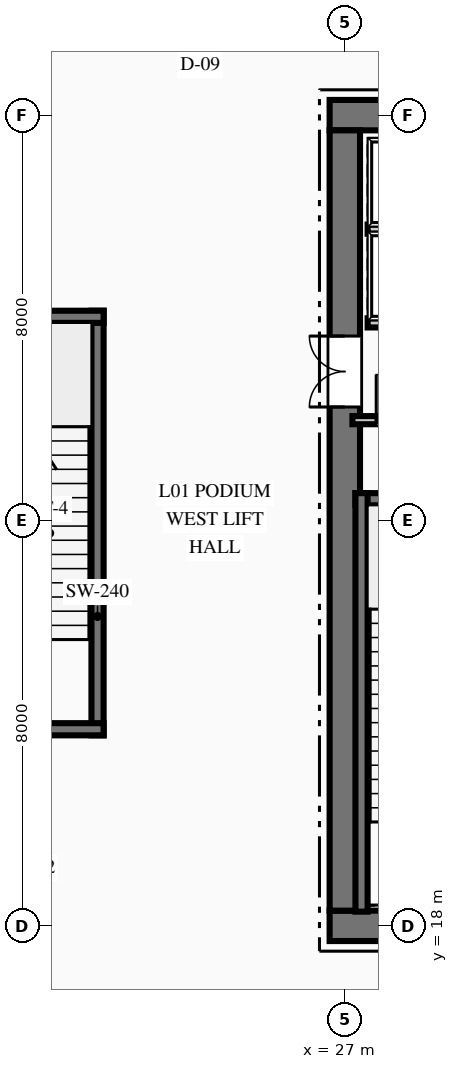
"""IFC4 building model, lengths in metres.
Left out: names, types, materials, properties, quantities, classifications, styles, units other than length and angle.
Written with IfcOpenShell. Run it as: python <this file> out.ifc"""

import sys

from ifc_helpers import new_model, si_unit, direction, frame, frame_2d, origin, place, context, subcontext, project, spatial, rectangle, extrude, element, fill, save


model = new_model("IFC4")
c1 = context("Model", 3, precision=1e-05, world=origin(), true_north=direction((0.0, 1.0)))
c2 = subcontext(c1, "Body", "Model", "MODEL_VIEW")
j1 = project(units=[si_unit("LENGTHUNIT", "METRE"), si_unit("PLANEANGLEUNIT", "RADIAN")], contexts=[c1])
p1 = place(None, origin())
s1 = spatial("IfcSite", under=j1, at=p1, CompositionType="ELEMENT")
p2 = place(p1, origin())
s2 = spatial("IfcBuilding", under=s1, at=p2, CompositionType="ELEMENT")
p3 = place(p2, frame((0.0, 0.0, 6.0)))
s3 = spatial("IfcBuildingStorey", under=s2, at=p3, CompositionType="ELEMENT", Elevation=6.0)
p4 = place(p3, frame((26.7, 18.0, 0.0), z_axis=(0.0, 0.0, 1.0), x_axis=(1.0, 0.0, 0.0)))
e1 = element("IfcWall", 1, at=p4, inside=s3, PredefinedType="SHEAR", context=c2, shape_type="SweptSolid", body=[
    extrude(rectangle(XDim=18.6, YDim=0.6, at=frame_2d((9.3, 0.0))), origin(), (0.0, 0.0, 1.0), 5.4),
])
p5 = place(p4, frame((7.4, 0.0, 0.0)))
e2 = element("IfcOpeningElement", 2, at=p5, cuts=e1, PredefinedType="OPENING", context=c2, shape_type="SweptSolid", body=[
    extrude(rectangle(XDim=1.1, YDim=2.15, at=frame_2d((0.55, 1.075))), frame((0.0, 0.31, 0.0), z_axis=(0.0, -1.0, 0.0), x_axis=(1.0, 0.0, 0.0)), (0.0, 0.0, 1.0), 0.62),
])
p6 = place(p4, frame((10.1, 0.0, 0.0)))
e3 = element("IfcOpeningElement", 3, at=p6, cuts=e1, PredefinedType="OPENING", context=c2, shape_type="SweptSolid", body=[
    extrude(rectangle(XDim=1.1, YDim=2.15, at=frame_2d((0.55, 1.075))), frame((0.0, 0.31, 0.0), z_axis=(0.0, -1.0, 0.0), x_axis=(1.0, 0.0, 0.0)), (0.0, 0.0, 1.0), 0.62),
])
p7 = place(p3, frame((26.7, 34.0, 0.0), z_axis=(0.0, 0.0, 1.0), x_axis=(1.0, 0.0, 0.0)))
e4 = element("IfcWall", 4, at=p7, inside=s3, PredefinedType="SHEAR", context=c2, shape_type="SweptSolid", body=[
    extrude(rectangle(XDim=18.6, YDim=0.6, at=frame_2d((9.3, 0.0))), origin(), (0.0, 0.0, 1.0), 5.4),
])
p8 = place(p7, frame((1.265, 0.0, 0.0)))
e5 = element("IfcOpeningElement", 5, at=p8, cuts=e4, PredefinedType="OPENING", context=c2, shape_type="SweptSolid", body=[
    extrude(rectangle(XDim=1.1, YDim=2.15, at=frame_2d((0.55, 1.075))), frame((0.0, 0.31, 0.0), z_axis=(0.0, -1.0, 0.0), x_axis=(1.0, 0.0, 0.0)), (0.0, 0.0, 1.0), 0.62),
])
p9 = place(p7, frame((3.515, 0.0, 0.0)))
e6 = element("IfcOpeningElement", 6, at=p9, cuts=e4, PredefinedType="OPENING", context=c2, shape_type="SweptSolid", body=[
    extrude(rectangle(XDim=1.1, YDim=2.15, at=frame_2d((0.55, 1.075))), frame((0.0, 0.31, 0.0), z_axis=(0.0, -1.0, 0.0), x_axis=(1.0, 0.0, 0.0)), (0.0, 0.0, 1.0), 0.62),
])
p10 = place(p7, frame((13.985, 0.0, 0.0)))
e7 = element("IfcOpeningElement", 7, at=p10, cuts=e4, PredefinedType="OPENING", context=c2, shape_type="SweptSolid", body=[
    extrude(rectangle(XDim=1.1, YDim=2.15, at=frame_2d((0.55, 1.075))), frame((0.0, 0.31, 0.0), z_axis=(0.0, -1.0, 0.0), x_axis=(1.0, 0.0, 0.0)), (0.0, 0.0, 1.0), 0.62),
])
p11 = place(p7, frame((16.235, 0.0, 0.0)))
e8 = element("IfcOpeningElement", 8, at=p11, cuts=e4, PredefinedType="OPENING", context=c2, shape_type="SweptSolid", body=[
    extrude(rectangle(XDim=1.1, YDim=2.15, at=frame_2d((0.55, 1.075))), frame((0.0, 0.31, 0.0), z_axis=(0.0, -1.0, 0.0), x_axis=(1.0, 0.0, 0.0)), (0.0, 0.0, 1.0), 0.62),
])
p12 = place(p3, frame((27.0, 18.3, 0.0), z_axis=(0.0, 0.0, 1.0), x_axis=(0.0, 1.0, 0.0)))
e9 = element("IfcWall", 9, at=p12, inside=s3, PredefinedType="SHEAR", context=c2, shape_type="SweptSolid", body=[
    extrude(rectangle(XDim=15.4, YDim=0.6, at=frame_2d((7.7, 0.0))), origin(), (0.0, 0.0, 1.0), 5.4),
])
p13 = place(p12, frame((9.94, 0.0, 0.0)))
e10 = element("IfcOpeningElement", 10, at=p13, cuts=e9, PredefinedType="OPENING", context=c2, shape_type="SweptSolid", body=[
    extrude(rectangle(XDim=1.4, YDim=2.2, at=frame_2d((0.7, 1.1))), frame((0.0, 0.31, 0.0), z_axis=(0.0, -1.0, 0.0), x_axis=(1.0, 0.0, 0.0)), (0.0, 0.0, 1.0), 0.62),
])
p14 = place(p3, frame((27.21, 26.42, 0.0), z_axis=(0.0, 0.0, 1.0), x_axis=(1.0, 0.0, 0.0)))
e11 = element("IfcWall", 11, at=p14, inside=s3, PredefinedType="SHEAR", context=c2, shape_type="SweptSolid", body=[
    extrude(rectangle(XDim=3.98, YDim=0.24, at=frame_2d((1.99, 0.0))), origin(), (0.0, 0.0, 1.0), 5.4),
])
p15 = place(p3, frame((27.33, 18.28, 0.0), z_axis=(0.0, 0.0, 1.0), x_axis=(0.0, 1.0, 0.0)))
e12 = element("IfcWall", 12, at=p15, inside=s3, PredefinedType="SHEAR", context=c2, shape_type="SweptSolid", body=[
    extrude(rectangle(XDim=8.26, YDim=0.24, at=frame_2d((4.13, 0.0))), origin(), (0.0, 0.0, 1.0), 5.4),
])
p16 = place(p3, frame((22.12, 21.76, 0.0), z_axis=(0.0, 0.0, 1.0), x_axis=(0.0, 1.0, 0.0)))
e13 = element("IfcWall", 13, at=p16, inside=s3, PredefinedType="SHEAR", context=c2, shape_type="SweptSolid", body=[
    extrude(rectangle(XDim=8.38, YDim=0.24, at=frame_2d((4.19, 0.0))), origin(), (0.0, 0.0, 1.0), 5.4),
])
p17 = place(p3, frame((18.26, 21.88, 0.0), z_axis=(0.0, 0.0, 1.0), x_axis=(1.0, 0.0, 0.0)))
e14 = element("IfcWall", 14, at=p17, inside=s3, PredefinedType="SHEAR", context=c2, shape_type="SweptSolid", body=[
    extrude(rectangle(XDim=3.98, YDim=0.24, at=frame_2d((1.99, 0.0))), origin(), (0.0, 0.0, 1.0), 5.4),
])
p18 = place(p17, frame((1.465, 0.0, 0.0)))
e15 = element("IfcOpeningElement", 15, at=p18, cuts=e14, PredefinedType="OPENING", context=c2, shape_type="SweptSolid", body=[
    extrude(rectangle(XDim=1.05, YDim=2.15, at=frame_2d((0.525, 1.075))), frame((0.0, 0.13, 0.0), z_axis=(0.0, -1.0, 0.0), x_axis=(1.0, 0.0, 0.0)), (0.0, 0.0, 1.0), 0.26),
])
p19 = place(p3, frame((18.26, 30.02, 0.0), z_axis=(0.0, 0.0, 1.0), x_axis=(1.0, 0.0, 0.0)))
e16 = element("IfcWall", 16, at=p19, inside=s3, PredefinedType="SHEAR", context=c2, shape_type="SweptSolid", body=[
    extrude(rectangle(XDim=3.98, YDim=0.24, at=frame_2d((1.99, 0.0))), origin(), (0.0, 0.0, 1.0), 5.4),
])
p20 = place(p3, frame((27.15, 27.98, 0.0), z_axis=(0.0, 0.0, 1.0), x_axis=(1.0, 0.0, 0.0)))
e17 = element("IfcWall", 17, at=p20, inside=s3, PredefinedType="PARTITIONING", context=c2, shape_type="SweptSolid", body=[
    extrude(rectangle(XDim=4.05, YDim=0.16, at=frame_2d((2.025, 0.0))), origin(), (0.0, 0.0, 1.0), 5.07),
])
p21 = place(p20, frame((0.47, 0.0, 0.0)))
e18 = element("IfcOpeningElement", 18, at=p21, cuts=e17, PredefinedType="OPENING", context=c2, shape_type="SweptSolid", body=[
    extrude(rectangle(XDim=0.9, YDim=2.15, at=frame_2d((0.45, 1.075))), frame((0.0, 0.09, 0.0), z_axis=(0.0, -1.0, 0.0), x_axis=(1.0, 0.0, 0.0)), (0.0, 0.0, 1.0), 0.18),
])
p22 = place(p20, frame((2.36, 0.0, 0.0)))
e19 = element("IfcOpeningElement", 19, at=p22, cuts=e17, PredefinedType="OPENING", context=c2, shape_type="SweptSolid", body=[
    extrude(rectangle(XDim=0.9, YDim=2.15, at=frame_2d((0.45, 1.075))), frame((0.0, 0.09, 0.0), z_axis=(0.0, -1.0, 0.0), x_axis=(1.0, 0.0, 0.0)), (0.0, 0.0, 1.0), 0.18),
])
p23 = place(p3, frame((27.45, 29.9, 0.0), z_axis=(0.0, 0.0, 1.0), x_axis=(1.0, 0.0, 0.0)))
e20 = element("IfcWall", 20, at=p23, inside=s3, PredefinedType="PARTITIONING", context=c2, shape_type="SweptSolid", body=[
    extrude(rectangle(XDim=4.43, YDim=0.18, at=frame_2d((2.215, 0.0))), origin(), (0.0, 0.0, 1.0), 5.07),
])
p24 = place(p23, frame((0.515, 0.0, 0.0)))
e21 = element("IfcOpeningElement", 21, at=p24, cuts=e20, PredefinedType="OPENING", context=c2, shape_type="SweptSolid", body=[
    extrude(rectangle(XDim=1.1, YDim=2.15, at=frame_2d((0.55, 1.075))), frame((0.0, 0.1, 0.0), z_axis=(0.0, -1.0, 0.0), x_axis=(1.0, 0.0, 0.0)), (0.0, 0.0, 1.0), 0.2),
])
p25 = place(p23, frame((2.765, 0.0, 0.0)))
e22 = element("IfcOpeningElement", 22, at=p25, cuts=e20, PredefinedType="OPENING", context=c2, shape_type="SweptSolid", body=[
    extrude(rectangle(XDim=1.1, YDim=2.15, at=frame_2d((0.55, 1.075))), frame((0.0, 0.1, 0.0), z_axis=(0.0, -1.0, 0.0), x_axis=(1.0, 0.0, 0.0)), (0.0, 0.0, 1.0), 0.2),
])
p26 = place(p3, frame((27.45, 31.75, 0.0), z_axis=(0.0, 0.0, 1.0), x_axis=(1.0, 0.0, 0.0)))
e23 = element("IfcWall", 23, at=p26, inside=s3, PredefinedType="PARTITIONING", context=c2, shape_type="SweptSolid", body=[
    extrude(rectangle(XDim=4.43, YDim=0.18, at=frame_2d((2.215, 0.0))), origin(), (0.0, 0.0, 1.0), 5.07),
])
p27 = place(p21, origin())
e24 = element("IfcDoor", 24, at=p27, inside=s3, OperationType="SINGLE_SWING_LEFT", PredefinedType="DOOR", context=c2, shape_type="SweptSolid", body=[
    extrude(rectangle(XDim=0.9, YDim=2.15, at=frame_2d((0.45, 1.075))), frame((0.0, 0.025, 0.0), z_axis=(0.0, -1.0, 0.0), x_axis=(1.0, 0.0, 0.0)), (0.0, 0.0, 1.0), 0.05),
])
fill(e18, e24)
p28 = place(p13, origin())
e25 = element("IfcDoor", 25, at=p28, inside=s3, OperationType="DOUBLE_DOOR_SINGLE_SWING", PredefinedType="DOOR", context=c2, shape_type="SweptSolid", body=[
    extrude(rectangle(XDim=1.4, YDim=2.2, at=frame_2d((0.7, 1.1))), frame((0.0, 0.025, 0.0), z_axis=(0.0, -1.0, 0.0), x_axis=(1.0, 0.0, 0.0)), (0.0, 0.0, 1.0), 0.05),
])
fill(e10, e25)
save(model, sys.argv[1])
